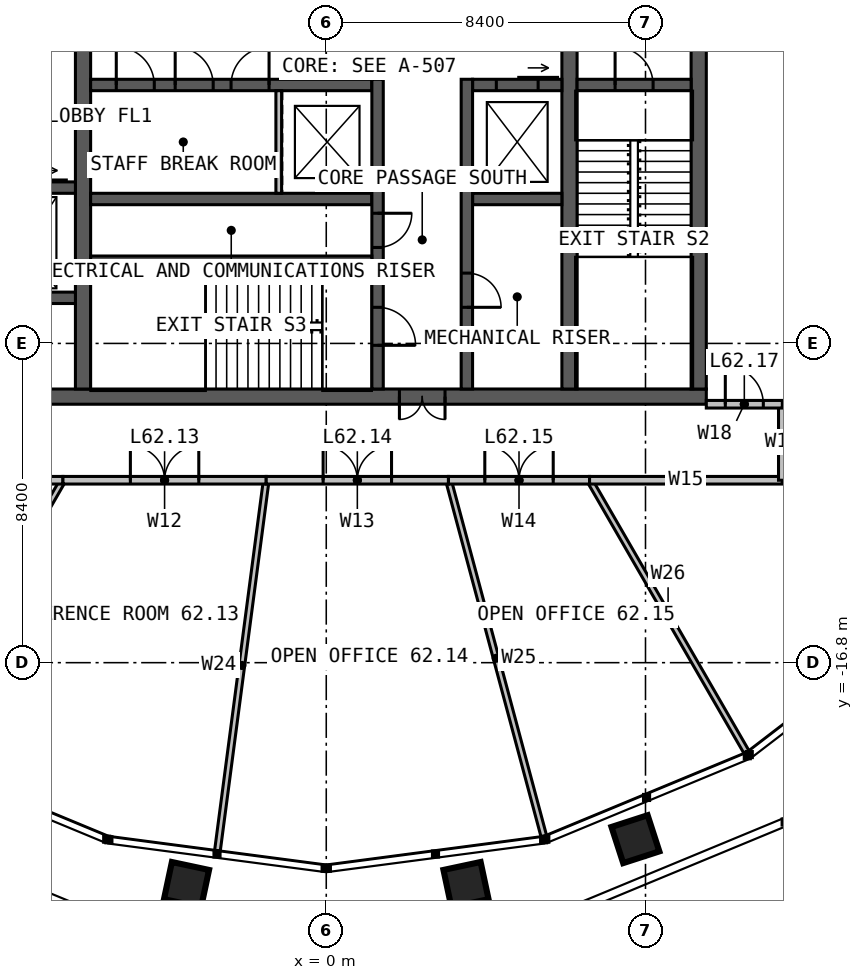
"""IFC4 building model, lengths in metres.
Left out: names, types, materials, properties, quantities, classifications, styles, units other than length and angle.
Written with IfcOpenShell. Run it as: python <this file> out.ifc"""

import sys

from ifc_helpers import new_model, si_unit, direction, frame, frame_2d, origin, place, context, subcontext, project, spatial, rectangle, extrude, element, fill, save


model = new_model("IFC4")
c1 = context("Model", 3, precision=1e-05, world=origin(), true_north=direction((0.0, 1.0)))
c2 = subcontext(c1, "Body", "Model", "MODEL_VIEW")
j1 = project(units=[si_unit("LENGTHUNIT", "METRE"), si_unit("PLANEANGLEUNIT", "RADIAN")], contexts=[c1])
p1 = place(None, origin())
s1 = spatial("IfcSite", under=j1, at=p1, CompositionType="ELEMENT")
p2 = place(p1, origin())
s2 = spatial("IfcBuilding", under=s1, at=p2, CompositionType="ELEMENT")
p3 = place(p2, frame((0.0, 0.0, 256.0)))
s3 = spatial("IfcBuildingStorey", under=s2, at=p3, CompositionType="ELEMENT", Elevation=256.0)
p4 = place(p3, frame((10.0, -9.8, 0.0), z_axis=(0.0, 0.0, 1.0), x_axis=(-1.0, 0.0, 0.0)))
e1 = element("IfcWall", 1, at=p4, inside=s3, PredefinedType="SOLIDWALL", context=c2, shape_type="SweptSolid", body=[
    extrude(rectangle(XDim=20.0, YDim=0.4, at=frame_2d((10.0, 0.0))), origin(), (0.0, 0.0, 1.0), 4.0),
])
p5 = place(p4, frame((6.875, 0.0, 0.0)))
e2 = element("IfcOpeningElement", 2, at=p5, cuts=e1, PredefinedType="OPENING", context=c2, shape_type="SweptSolid", body=[
    extrude(rectangle(XDim=1.2, YDim=2.2, at=frame_2d((0.6, 1.1))), frame((0.0, 0.21, 0.0), z_axis=(0.0, -1.0, 0.0), x_axis=(1.0, 0.0, 0.0)), (0.0, 0.0, 1.0), 0.42),
])
p6 = place(p3, frame((9.8, -9.6, 0.0), z_axis=(0.0, 0.0, 1.0), x_axis=(0.0, 1.0, 0.0)))
e3 = element("IfcWall", 3, at=p6, inside=s3, PredefinedType="SOLIDWALL", context=c2, shape_type="SweptSolid", body=[
    extrude(rectangle(XDim=19.2, YDim=0.4, at=frame_2d((9.6, 0.0))), origin(), (0.0, 0.0, 1.0), 4.0),
])
p7 = place(p3, frame((-6.4, -9.6, 0.0), z_axis=(0.0, 0.0, 1.0), x_axis=(0.0, 1.0, 0.0)))
e4 = element("IfcWall", 4, at=p7, inside=s3, PredefinedType="SOLIDWALL", context=c2, shape_type="SweptSolid", body=[
    extrude(rectangle(XDim=19.2, YDim=0.4, at=frame_2d((9.6, 0.0))), origin(), (0.0, 0.0, 1.0), 4.0),
])
p8 = place(p7, frame((9.1, 0.0, 0.0)))
e5 = element("IfcOpeningElement", 5, at=p8, cuts=e4, PredefinedType="OPENING", context=c2, shape_type="SweptSolid", body=[
    extrude(rectangle(XDim=1.0, YDim=2.2, at=frame_2d((0.5, 1.1))), frame((0.0, 0.21, 0.0), z_axis=(0.0, -1.0, 0.0), x_axis=(1.0, 0.0, 0.0)), (0.0, 0.0, 1.0), 0.42),
])
p9 = place(p3, frame((6.4, 9.6, 0.0), z_axis=(0.0, 0.0, 1.0), x_axis=(0.0, -1.0, 0.0)))
e6 = element("IfcWall", 6, at=p9, inside=s3, PredefinedType="SOLIDWALL", context=c2, shape_type="SweptSolid", body=[
    extrude(rectangle(XDim=19.2, YDim=0.4, at=frame_2d((9.6, 0.0))), origin(), (0.0, 0.0, 1.0), 4.0),
])
p10 = place(p9, frame((9.1, 0.0, 0.0)))
e7 = element("IfcOpeningElement", 7, at=p10, cuts=e6, PredefinedType="OPENING", context=c2, shape_type="SweptSolid", body=[
    extrude(rectangle(XDim=1.0, YDim=2.2, at=frame_2d((0.5, 1.1))), frame((0.0, 0.21, 0.0), z_axis=(0.0, -1.0, 0.0), x_axis=(1.0, 0.0, 0.0)), (0.0, 0.0, 1.0), 0.42),
])
p11 = place(p3, frame((-6.2, -1.6, 0.0), z_axis=(0.0, 0.0, 1.0), x_axis=(1.0, 0.0, 0.0)))
e8 = element("IfcWall", 8, at=p11, inside=s3, PredefinedType="SOLIDWALL", context=c2, shape_type="SweptSolid", body=[
    extrude(rectangle(XDim=7.4, YDim=0.3, at=frame_2d((3.7, 0.0))), origin(), (0.0, 0.0, 1.0), 4.0),
])
p12 = place(p11, frame((0.675, 0.0, 0.0)))
e9 = element("IfcOpeningElement", 9, at=p12, cuts=e8, PredefinedType="OPENING", context=c2, shape_type="SweptSolid", body=[
    extrude(rectangle(XDim=1.0, YDim=2.2, at=frame_2d((0.5, 1.1))), frame((0.0, 0.16, 0.0), z_axis=(0.0, -1.0, 0.0), x_axis=(1.0, 0.0, 0.0)), (0.0, 0.0, 1.0), 0.32),
])
p13 = place(p11, frame((2.225, 0.0, 0.0)))
e10 = element("IfcOpeningElement", 10, at=p13, cuts=e8, PredefinedType="OPENING", context=c2, shape_type="SweptSolid", body=[
    extrude(rectangle(XDim=1.0, YDim=2.2, at=frame_2d((0.5, 1.1))), frame((0.0, 0.16, 0.0), z_axis=(0.0, -1.0, 0.0), x_axis=(1.0, 0.0, 0.0)), (0.0, 0.0, 1.0), 0.32),
])
p14 = place(p11, frame((3.695, 0.0, 0.0)))
e11 = element("IfcOpeningElement", 11, at=p14, cuts=e8, PredefinedType="OPENING", context=c2, shape_type="SweptSolid", body=[
    extrude(rectangle(XDim=1.0, YDim=2.2, at=frame_2d((0.5, 1.1))), frame((0.0, 0.16, 0.0), z_axis=(0.0, -1.0, 0.0), x_axis=(1.0, 0.0, 0.0)), (0.0, 0.0, 1.0), 0.32),
])
p15 = place(p3, frame((3.85, -1.6, 0.0), z_axis=(0.0, 0.0, 1.0), x_axis=(1.0, 0.0, 0.0)))
e12 = element("IfcWall", 12, at=p15, inside=s3, PredefinedType="SOLIDWALL", context=c2, shape_type="SweptSolid", body=[
    extrude(rectangle(XDim=2.35, YDim=0.3, at=frame_2d((1.175, 0.0))), origin(), (0.0, 0.0, 1.0), 4.0),
])
p16 = place(p15, frame((0.625, 0.0, 0.0)))
e13 = element("IfcOpeningElement", 13, at=p16, cuts=e12, PredefinedType="OPENING", context=c2, shape_type="SweptSolid", body=[
    extrude(rectangle(XDim=1.1, YDim=2.2, at=frame_2d((0.55, 1.1))), frame((0.0, 0.16, 0.0), z_axis=(0.0, -1.0, 0.0), x_axis=(1.0, 0.0, 0.0)), (0.0, 0.0, 1.0), 0.32),
])
p17 = place(p3, frame((-6.2, -4.6, 0.0), z_axis=(0.0, 0.0, 1.0), x_axis=(1.0, 0.0, 0.0)))
e14 = element("IfcWall", 14, at=p17, inside=s3, PredefinedType="SOLIDWALL", context=c2, shape_type="SweptSolid", body=[
    extrude(rectangle(XDim=7.4, YDim=0.3, at=frame_2d((3.7, 0.0))), origin(), (0.0, 0.0, 1.0), 4.0),
])
p18 = place(p3, frame((3.85, -4.6, 0.0), z_axis=(0.0, 0.0, 1.0), x_axis=(1.0, 0.0, 0.0)))
e15 = element("IfcWall", 15, at=p18, inside=s3, PredefinedType="SOLIDWALL", context=c2, shape_type="SweptSolid", body=[
    extrude(rectangle(XDim=2.35, YDim=0.3, at=frame_2d((1.175, 0.0))), origin(), (0.0, 0.0, 1.0), 4.0),
])
p19 = place(p3, frame((1.35, -1.45, 0.0), z_axis=(0.0, 0.0, 1.0), x_axis=(0.0, -1.0, 0.0)))
e16 = element("IfcWall", 16, at=p19, inside=s3, PredefinedType="SOLIDWALL", context=c2, shape_type="SweptSolid", body=[
    extrude(rectangle(XDim=8.15, YDim=0.3, at=frame_2d((4.075, 0.0))), origin(), (0.0, 0.0, 1.0), 4.0),
])
p20 = place(p19, frame((6.0, 0.0, 0.0)))
e17 = element("IfcOpeningElement", 17, at=p20, cuts=e16, PredefinedType="OPENING", context=c2, shape_type="SweptSolid", body=[
    extrude(rectangle(XDim=1.0, YDim=2.2, at=frame_2d((0.5, 1.1))), frame((0.0, 0.16, 0.0), z_axis=(0.0, -1.0, 0.0), x_axis=(1.0, 0.0, 0.0)), (0.0, 0.0, 1.0), 0.32),
])
p21 = place(p19, frame((3.525, 0.0, 0.0)))
e18 = element("IfcOpeningElement", 18, at=p21, cuts=e16, PredefinedType="OPENING", context=c2, shape_type="SweptSolid", body=[
    extrude(rectangle(XDim=0.9, YDim=2.2, at=frame_2d((0.45, 1.1))), frame((0.0, 0.16, 0.0), z_axis=(0.0, -1.0, 0.0), x_axis=(1.0, 0.0, 0.0)), (0.0, 0.0, 1.0), 0.32),
])
p22 = place(p3, frame((3.7, -1.45, 0.0), z_axis=(0.0, 0.0, 1.0), x_axis=(0.0, -1.0, 0.0)))
e19 = element("IfcWall", 19, at=p22, inside=s3, PredefinedType="SOLIDWALL", context=c2, shape_type="SweptSolid", body=[
    extrude(rectangle(XDim=8.15, YDim=0.3, at=frame_2d((4.075, 0.0))), origin(), (0.0, 0.0, 1.0), 4.0),
])
p23 = place(p22, frame((5.1, 0.0, 0.0)))
e20 = element("IfcOpeningElement", 20, at=p23, cuts=e19, PredefinedType="OPENING", context=c2, shape_type="SweptSolid", body=[
    extrude(rectangle(XDim=0.9, YDim=2.2, at=frame_2d((0.45, 1.1))), frame((0.0, 0.16, 0.0), z_axis=(0.0, -1.0, 0.0), x_axis=(1.0, 0.0, 0.0)), (0.0, 0.0, 1.0), 0.32),
])
p24 = place(p3, frame((-6.2, -6.2, 0.0), z_axis=(0.0, 0.0, 1.0), x_axis=(1.0, 0.0, 0.0)))
e21 = element("IfcWall", 21, at=p24, inside=s3, PredefinedType="SOLIDWALL", context=c2, shape_type="SweptSolid", body=[
    extrude(rectangle(XDim=7.4, YDim=0.2, at=frame_2d((3.7, 0.0))), origin(), (0.0, 0.0, 1.0), 4.0),
])
p25 = place(p3, frame((6.6, -1.6, 0.0), z_axis=(0.0, 0.0, 1.0), x_axis=(1.0, 0.0, 0.0)))
e22 = element("IfcWall", 22, at=p25, inside=s3, PredefinedType="SOLIDWALL", context=c2, shape_type="SweptSolid", body=[
    extrude(rectangle(XDim=3.0, YDim=0.3, at=frame_2d((1.5, 0.0))), origin(), (0.0, 0.0, 1.0), 4.0),
])
p26 = place(p25, frame((1.0, 0.0, 0.0)))
e23 = element("IfcOpeningElement", 23, at=p26, cuts=e22, PredefinedType="OPENING", context=c2, shape_type="SweptSolid", body=[
    extrude(rectangle(XDim=1.0, YDim=2.2, at=frame_2d((0.5, 1.1))), frame((0.0, 0.16, 0.0), z_axis=(0.0, -1.0, 0.0), x_axis=(1.0, 0.0, 0.0)), (0.0, 0.0, 1.0), 0.32),
])
p27 = place(p3, frame((-9.6, -4.3, 0.0), z_axis=(0.0, 0.0, 1.0), x_axis=(1.0, 0.0, 0.0)))
e24 = element("IfcWall", 24, at=p27, inside=s3, PredefinedType="SOLIDWALL", context=c2, shape_type="SweptSolid", body=[
    extrude(rectangle(XDim=3.0, YDim=0.3, at=frame_2d((1.5, 0.0))), origin(), (0.0, 0.0, 1.0), 4.0),
])
p28 = place(p27, frame((1.15, 0.0, 0.0)))
e25 = element("IfcOpeningElement", 25, at=p28, cuts=e24, PredefinedType="OPENING", context=c2, shape_type="SweptSolid", body=[
    extrude(rectangle(XDim=1.1, YDim=2.2, at=frame_2d((0.55, 1.1))), frame((0.0, 0.16, 0.0), z_axis=(0.0, -1.0, 0.0), x_axis=(1.0, 0.0, 0.0)), (0.0, 0.0, 1.0), 0.32),
])
p29 = place(p3, frame((-9.6, -7.2, 0.0), z_axis=(0.0, 0.0, 1.0), x_axis=(1.0, 0.0, 0.0)))
e26 = element("IfcWall", 26, at=p29, inside=s3, PredefinedType="SOLIDWALL", context=c2, shape_type="SweptSolid", body=[
    extrude(rectangle(XDim=3.0, YDim=0.3, at=frame_2d((1.5, 0.0))), origin(), (0.0, 0.0, 1.0), 4.0),
])
p30 = place(p3, frame((-1.25, -1.75, 0.0), z_axis=(0.0, 0.0, 1.0), x_axis=(0.0, -1.0, 0.0)))
e27 = element("IfcWall", 27, at=p30, inside=s3, PredefinedType="PARTITIONING", context=c2, shape_type="SweptSolid", body=[
    extrude(rectangle(XDim=2.7, YDim=0.15, at=frame_2d((1.35, 0.0))), origin(), (0.0, 0.0, 1.0), 3.75),
])
p31 = place(p3, frame((-6.928, -12.0, 0.0), z_axis=(0.0, 0.0, 1.0), x_axis=(-0.499989206474, -0.86603163534, 0.0)))
e28 = element("IfcWall", 28, at=p31, inside=s3, PredefinedType="PARTITIONING", context=c2, shape_type="SweptSolid", body=[
    extrude(rectangle(XDim=8.266, YDim=0.15, at=frame_2d((4.133, 0.0))), origin(), (0.0, 0.0, 1.0), 2.79),
])
p32 = place(p3, frame((-1.58, -12.0, 0.0), z_axis=(0.0, 0.0, 1.0), x_axis=(-0.130521974705, -0.991445416611, 0.0)))
e29 = element("IfcWall", 29, at=p32, inside=s3, PredefinedType="PARTITIONING", context=c2, shape_type="SweptSolid", body=[
    extrude(rectangle(XDim=9.829, YDim=0.15, at=frame_2d((4.915, 0.0))), origin(), (0.0, 0.0, 1.0), 2.79),
])
p33 = place(p3, frame((3.215, -12.0, 0.0), z_axis=(0.0, 0.0, 1.0), x_axis=(0.258818707819, -0.965925916664, 0.0)))
e30 = element("IfcWall", 30, at=p33, inside=s3, PredefinedType="PARTITIONING", context=c2, shape_type="SweptSolid", body=[
    extrude(rectangle(XDim=9.699, YDim=0.15, at=frame_2d((4.85, 0.0))), origin(), (0.0, 0.0, 1.0), 2.79),
])
p34 = place(p3, frame((6.928, -12.0, 0.0), z_axis=(0.0, 0.0, 1.0), x_axis=(0.499989206474, -0.86603163534, 0.0)))
e31 = element("IfcWall", 31, at=p34, inside=s3, PredefinedType="PARTITIONING", context=c2, shape_type="SweptSolid", body=[
    extrude(rectangle(XDim=8.266, YDim=0.15, at=frame_2d((4.133, 0.0))), origin(), (0.0, 0.0, 1.0), 2.79),
])
p35 = place(p3, frame((-12.0, -12.0, 0.0), z_axis=(0.0, 0.0, 1.0), x_axis=(1.0, 0.0, 0.0)))
e32 = element("IfcWall", 32, at=p35, inside=s3, PredefinedType="PARTITIONING", context=c2, shape_type="SweptSolid", body=[
    extrude(rectangle(XDim=5.072, YDim=0.2, at=frame_2d((2.536, 0.0))), origin(), (0.0, 0.0, 1.0), 3.8),
])
p36 = place(p3, frame((-6.928, -12.0, 0.0), z_axis=(0.0, 0.0, 1.0), x_axis=(1.0, 0.0, 0.0)))
e33 = element("IfcWall", 33, at=p36, inside=s3, PredefinedType="PARTITIONING", context=c2, shape_type="SweptSolid", body=[
    extrude(rectangle(XDim=5.348, YDim=0.2, at=frame_2d((2.674, 0.0))), origin(), (0.0, 0.0, 1.0), 3.8),
])
p37 = place(p36, frame((1.774, 0.0, 0.0)))
e34 = element("IfcOpeningElement", 34, at=p37, cuts=e33, PredefinedType="OPENING", context=c2, shape_type="SweptSolid", body=[
    extrude(rectangle(XDim=1.8, YDim=2.2, at=frame_2d((0.9, 1.1))), frame((0.0, 0.11, 0.0), z_axis=(0.0, -1.0, 0.0), x_axis=(1.0, 0.0, 0.0)), (0.0, 0.0, 1.0), 0.22),
])
p38 = place(p3, frame((-1.58, -12.0, 0.0), z_axis=(0.0, 0.0, 1.0), x_axis=(1.0, 0.0, 0.0)))
e35 = element("IfcWall", 35, at=p38, inside=s3, PredefinedType="PARTITIONING", context=c2, shape_type="SweptSolid", body=[
    extrude(rectangle(XDim=4.795, YDim=0.2, at=frame_2d((2.397, 0.0))), origin(), (0.0, 0.0, 1.0), 3.8),
])
p39 = place(p38, frame((1.498, 0.0, 0.0)))
e36 = element("IfcOpeningElement", 36, at=p39, cuts=e35, PredefinedType="OPENING", context=c2, shape_type="SweptSolid", body=[
    extrude(rectangle(XDim=1.8, YDim=2.2, at=frame_2d((0.9, 1.1))), frame((0.0, 0.11, 0.0), z_axis=(0.0, -1.0, 0.0), x_axis=(1.0, 0.0, 0.0)), (0.0, 0.0, 1.0), 0.22),
])
p40 = place(p3, frame((3.215, -12.0, 0.0), z_axis=(0.0, 0.0, 1.0), x_axis=(1.0, 0.0, 0.0)))
e37 = element("IfcWall", 37, at=p40, inside=s3, PredefinedType="PARTITIONING", context=c2, shape_type="SweptSolid", body=[
    extrude(rectangle(XDim=3.713, YDim=0.2, at=frame_2d((1.856, 0.0))), origin(), (0.0, 0.0, 1.0), 3.8),
])
p41 = place(p40, frame((0.956, 0.0, 0.0)))
e38 = element("IfcOpeningElement", 38, at=p41, cuts=e37, PredefinedType="OPENING", context=c2, shape_type="SweptSolid", body=[
    extrude(rectangle(XDim=1.8, YDim=2.2, at=frame_2d((0.9, 1.1))), frame((0.0, 0.11, 0.0), z_axis=(0.0, -1.0, 0.0), x_axis=(1.0, 0.0, 0.0)), (0.0, 0.0, 1.0), 0.22),
])
p42 = place(p3, frame((6.928, -12.0, 0.0), z_axis=(0.0, 0.0, 1.0), x_axis=(1.0, 0.0, 0.0)))
e39 = element("IfcWall", 39, at=p42, inside=s3, PredefinedType="PARTITIONING", context=c2, shape_type="SweptSolid", body=[
    extrude(rectangle(XDim=5.072, YDim=0.2, at=frame_2d((2.536, 0.0))), origin(), (0.0, 0.0, 1.0), 3.8),
])
p43 = place(p3, frame((12.0, -12.0, 0.0), z_axis=(0.0, 0.0, 1.0), x_axis=(0.0, 1.0, 0.0)))
e40 = element("IfcWall", 40, at=p43, inside=s3, PredefinedType="PARTITIONING", context=c2, shape_type="SweptSolid", body=[
    extrude(rectangle(XDim=2.0, YDim=0.2, at=frame_2d((1.0, 0.0))), origin(), (0.0, 0.0, 1.0), 3.8),
])
p44 = place(p3, frame((10.0, -10.0, 0.0), z_axis=(0.0, 0.0, 1.0), x_axis=(1.0, 0.0, 0.0)))
e41 = element("IfcWall", 41, at=p44, inside=s3, PredefinedType="PARTITIONING", context=c2, shape_type="SweptSolid", body=[
    extrude(rectangle(XDim=2.0, YDim=0.2, at=frame_2d((1.0, 0.0))), origin(), (0.0, 0.0, 1.0), 3.8),
])
p45 = place(p44, frame((0.5, 0.0, 0.0)))
e42 = element("IfcOpeningElement", 42, at=p45, cuts=e41, PredefinedType="OPENING", context=c2, shape_type="SweptSolid", body=[
    extrude(rectangle(XDim=1.0, YDim=2.2, at=frame_2d((0.5, 1.1))), frame((0.0, 0.11, 0.0), z_axis=(0.0, -1.0, 0.0), x_axis=(1.0, 0.0, 0.0)), (0.0, 0.0, 1.0), 0.22),
])
p46 = place(p5, origin())
e43 = element("IfcDoor", 43, at=p46, inside=s3, OperationType="DOUBLE_DOOR_SINGLE_SWING", PredefinedType="DOOR", context=c2, shape_type="SweptSolid", body=[
    extrude(rectangle(XDim=1.2, YDim=2.2, at=frame_2d((0.6, 1.1))), frame((0.0, 0.025, 0.0), z_axis=(0.0, -1.0, 0.0), x_axis=(1.0, 0.0, 0.0)), (0.0, 0.0, 1.0), 0.05),
])
fill(e2, e43)
p47 = place(p26, origin())
e44 = element("IfcDoor", 44, at=p47, inside=s3, OperationType="SINGLE_SWING_LEFT", PredefinedType="DOOR", context=c2, shape_type="SweptSolid", body=[
    extrude(rectangle(XDim=1.0, YDim=2.2, at=frame_2d((0.5, 1.1))), frame((0.0, 0.025, 0.0), z_axis=(0.0, -1.0, 0.0), x_axis=(1.0, 0.0, 0.0)), (0.0, 0.0, 1.0), 0.05),
])
fill(e23, e44)
p48 = place(p20, origin())
e45 = element("IfcDoor", 45, at=p48, inside=s3, OperationType="SINGLE_SWING_RIGHT", PredefinedType="DOOR", context=c2, shape_type="SweptSolid", body=[
    extrude(rectangle(XDim=1.0, YDim=2.2, at=frame_2d((0.5, 1.1))), frame((0.0, 0.025, 0.0), z_axis=(0.0, -1.0, 0.0), x_axis=(1.0, 0.0, 0.0)), (0.0, 0.0, 1.0), 0.05),
])
fill(e17, e45)
p49 = place(p21, origin())
e46 = element("IfcDoor", 46, at=p49, inside=s3, OperationType="SINGLE_SWING_LEFT", PredefinedType="DOOR", context=c2, shape_type="SweptSolid", body=[
    extrude(rectangle(XDim=0.9, YDim=2.2, at=frame_2d((0.45, 1.1))), frame((0.0, 0.025, 0.0), z_axis=(0.0, -1.0, 0.0), x_axis=(1.0, 0.0, 0.0)), (0.0, 0.0, 1.0), 0.05),
])
fill(e18, e46)
p50 = place(p23, origin())
e47 = element("IfcDoor", 47, at=p50, inside=s3, OperationType="SINGLE_SWING_RIGHT", PredefinedType="DOOR", context=c2, shape_type="SweptSolid", body=[
    extrude(rectangle(XDim=0.9, YDim=2.2, at=frame_2d((0.45, 1.1))), frame((0.0, 0.025, 0.0), z_axis=(0.0, -1.0, 0.0), x_axis=(1.0, 0.0, 0.0)), (0.0, 0.0, 1.0), 0.05),
])
fill(e20, e47)
p51 = place(p12, origin())
e48 = element("IfcDoor", 48, at=p51, inside=s3, OperationType="SINGLE_SWING_LEFT", PredefinedType="DOOR", context=c2, shape_type="SweptSolid", body=[
    extrude(rectangle(XDim=1.0, YDim=2.2, at=frame_2d((0.5, 1.1))), frame((0.0, 0.025, 0.0), z_axis=(0.0, -1.0, 0.0), x_axis=(1.0, 0.0, 0.0)), (0.0, 0.0, 1.0), 0.05),
])
fill(e9, e48)
p52 = place(p13, origin())
e49 = element("IfcDoor", 49, at=p52, inside=s3, OperationType="SINGLE_SWING_LEFT", PredefinedType="DOOR", context=c2, shape_type="SweptSolid", body=[
    extrude(rectangle(XDim=1.0, YDim=2.2, at=frame_2d((0.5, 1.1))), frame((0.0, 0.025, 0.0), z_axis=(0.0, -1.0, 0.0), x_axis=(1.0, 0.0, 0.0)), (0.0, 0.0, 1.0), 0.05),
])
fill(e10, e49)
p53 = place(p14, origin())
e50 = element("IfcDoor", 50, at=p53, inside=s3, OperationType="SINGLE_SWING_RIGHT", PredefinedType="DOOR", context=c2, shape_type="SweptSolid", body=[
    extrude(rectangle(XDim=1.0, YDim=2.2, at=frame_2d((0.5, 1.1))), frame((0.0, 0.025, 0.0), z_axis=(0.0, -1.0, 0.0), x_axis=(1.0, 0.0, 0.0)), (0.0, 0.0, 1.0), 0.05),
])
fill(e11, e50)
p54 = place(p16, origin())
e51 = element("IfcDoor", 51, at=p54, inside=s3, OperationType="SLIDING_TO_LEFT", PredefinedType="DOOR", context=c2, shape_type="SweptSolid", body=[
    extrude(rectangle(XDim=1.1, YDim=2.2, at=frame_2d((0.55, 1.1))), frame((0.0, 0.025, 0.0), z_axis=(0.0, -1.0, 0.0), x_axis=(1.0, 0.0, 0.0)), (0.0, 0.0, 1.0), 0.05),
])
fill(e13, e51)
p55 = place(p37, origin())
e52 = element("IfcDoor", 52, at=p55, inside=s3, OperationType="DOUBLE_DOOR_SINGLE_SWING", PredefinedType="DOOR", context=c2, shape_type="SweptSolid", body=[
    extrude(rectangle(XDim=1.8, YDim=2.2, at=frame_2d((0.9, 1.1))), frame((0.0, 0.025, 0.0), z_axis=(0.0, -1.0, 0.0), x_axis=(1.0, 0.0, 0.0)), (0.0, 0.0, 1.0), 0.05),
])
fill(e34, e52)
p56 = place(p39, origin())
e53 = element("IfcDoor", 53, at=p56, inside=s3, OperationType="DOUBLE_DOOR_SINGLE_SWING", PredefinedType="DOOR", context=c2, shape_type="SweptSolid", body=[
    extrude(rectangle(XDim=1.8, YDim=2.2, at=frame_2d((0.9, 1.1))), frame((0.0, 0.025, 0.0), z_axis=(0.0, -1.0, 0.0), x_axis=(1.0, 0.0, 0.0)), (0.0, 0.0, 1.0), 0.05),
])
fill(e36, e53)
p57 = place(p41, origin())
e54 = element("IfcDoor", 54, at=p57, inside=s3, OperationType="DOUBLE_DOOR_SINGLE_SWING", PredefinedType="DOOR", context=c2, shape_type="SweptSolid", body=[
    extrude(rectangle(XDim=1.8, YDim=2.2, at=frame_2d((0.9, 1.1))), frame((0.0, 0.025, 0.0), z_axis=(0.0, -1.0, 0.0), x_axis=(1.0, 0.0, 0.0)), (0.0, 0.0, 1.0), 0.05),
])
fill(e38, e54)
p58 = place(p45, origin())
e55 = element("IfcDoor", 55, at=p58, inside=s3, OperationType="SINGLE_SWING_LEFT", PredefinedType="DOOR", context=c2, shape_type="SweptSolid", body=[
    extrude(rectangle(XDim=1.0, YDim=2.2, at=frame_2d((0.5, 1.1))), frame((0.0, 0.025, 0.0), z_axis=(0.0, -1.0, 0.0), x_axis=(1.0, 0.0, 0.0)), (0.0, 0.0, 1.0), 0.05),
])
fill(e42, e55)
save(model, sys.argv[1])
